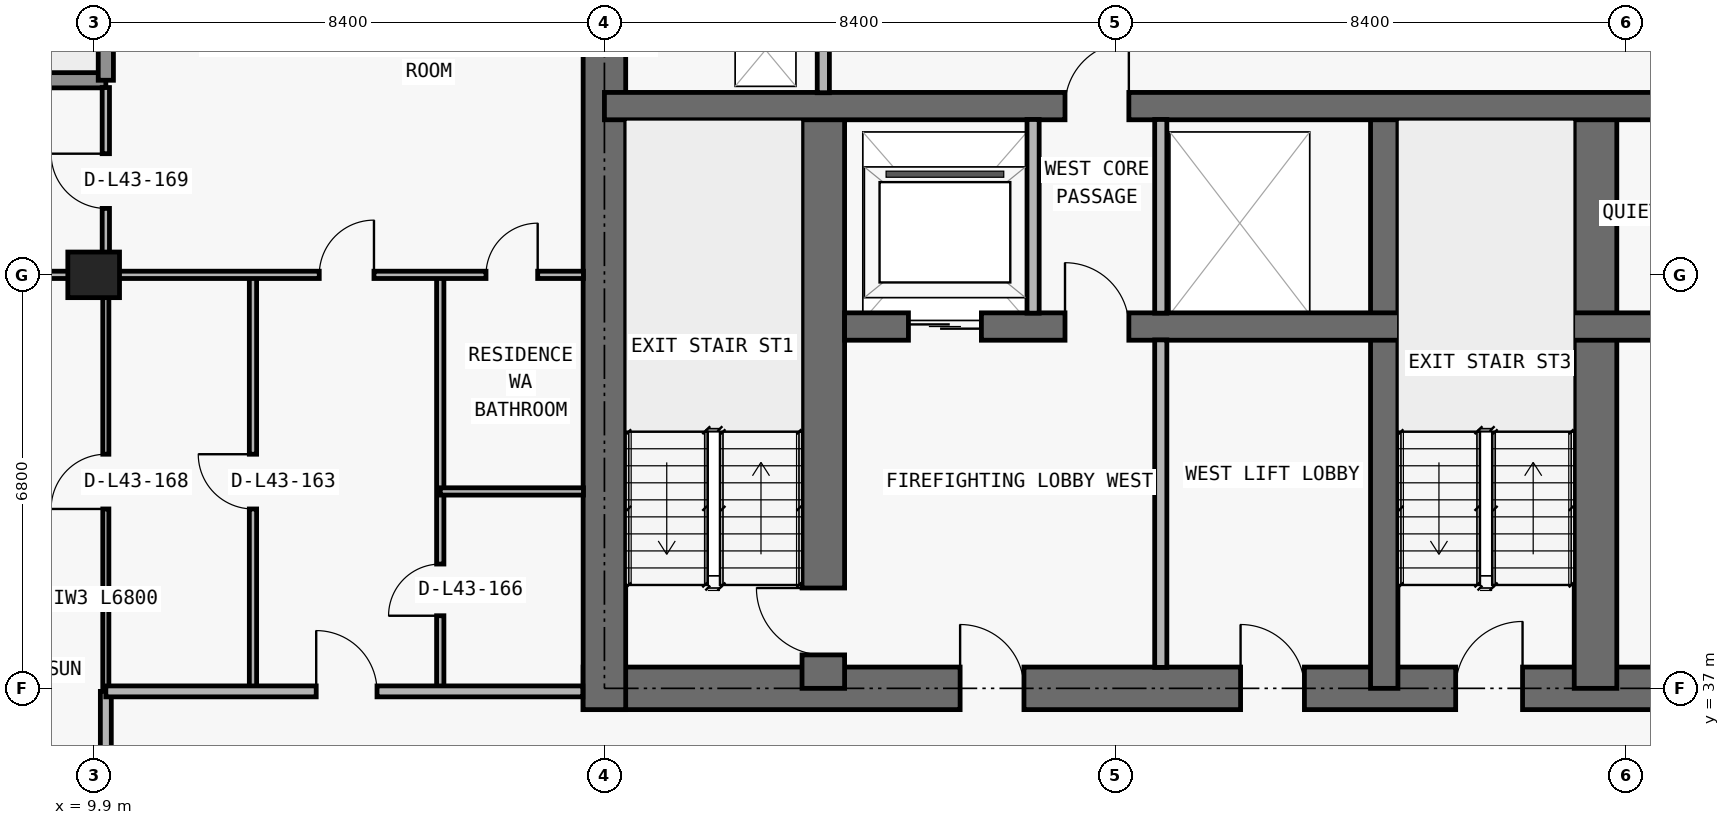
"""IFC4 building model, lengths in metres.
Left out: names, types, materials, properties, quantities, classifications, styles, units other than length and angle.
Written with IfcOpenShell. Run it as: python <this file> out.ifc"""

import sys

from ifc_helpers import new_model, si_unit, direction, frame, frame_2d, origin, origin_2d, place, context, subcontext, project, spatial, rectangle, extrude, element, fill, save


model = new_model("IFC4")
c1 = context("Model", 3, precision=1e-05, world=origin(), true_north=direction((0.0, 1.0)))
c2 = subcontext(c1, "Body", "Model", "MODEL_VIEW")
j1 = project(units=[si_unit("LENGTHUNIT", "METRE"), si_unit("PLANEANGLEUNIT", "RADIAN")], contexts=[c1])
p1 = place(None, origin())
s1 = spatial("IfcSite", under=j1, at=p1, CompositionType="ELEMENT")
p2 = place(p1, origin())
s2 = spatial("IfcBuilding", under=s1, at=p2, CompositionType="ELEMENT")
p3 = place(p2, frame((0.0, 0.0, 157.2)))
s3 = spatial("IfcBuildingStorey", under=s2, at=p3, CompositionType="ELEMENT", Elevation=157.2)
p4 = place(p3, frame((9.9, 43.8, 0.0), z_axis=(0.0, 0.0, 1.0), x_axis=(1.0, 0.0, 0.0)))
e1 = element("IfcColumn", 1, at=p4, inside=s3, PredefinedType="COLUMN", context=c2, shape_type="SweptSolid", body=[
    extrude(rectangle(XDim=0.85, YDim=0.75, at=origin_2d()), origin(), (0.0, 0.0, 1.0), 3.05),
])
p5 = place(p3, frame((17.95, 37.0, 0.0), z_axis=(0.0, 0.0, 1.0), x_axis=(1.0, 0.0, 0.0)))
e2 = element("IfcWall", 2, at=p5, inside=s3, PredefinedType="SHEAR", context=c2, shape_type="SweptSolid", body=[
    extrude(rectangle(XDim=41.9, YDim=0.7, at=frame_2d((20.95, 0.0))), origin(), (0.0, 0.0, 1.0), 3.05),
])
p6 = place(p5, frame((14.35, 0.0, 0.0)))
e3 = element("IfcOpeningElement", 3, at=p6, cuts=e2, PredefinedType="OPENING", context=c2, shape_type="SweptSolid", body=[
    extrude(rectangle(XDim=1.1, YDim=2.15, at=frame_2d((0.55, 1.075))), frame((0.0, 0.36, 0.0), z_axis=(0.0, -1.0, 0.0), x_axis=(1.0, 0.0, 0.0)), (0.0, 0.0, 1.0), 0.72),
])
p7 = place(p5, frame((6.2, 0.0, 0.0)))
e4 = element("IfcOpeningElement", 4, at=p7, cuts=e2, PredefinedType="OPENING", context=c2, shape_type="SweptSolid", body=[
    extrude(rectangle(XDim=1.05, YDim=2.15, at=frame_2d((0.525, 1.075))), frame((0.0, 0.36, 0.0), z_axis=(0.0, -1.0, 0.0), x_axis=(1.0, 0.0, 0.0)), (0.0, 0.0, 1.0), 0.72),
])
p8 = place(p5, frame((34.7, 0.0, 0.0)))
e5 = element("IfcOpeningElement", 5, at=p8, cuts=e2, PredefinedType="OPENING", context=c2, shape_type="SweptSolid", body=[
    extrude(rectangle(XDim=1.05, YDim=2.15, at=frame_2d((0.525, 1.075))), frame((0.0, 0.36, 0.0), z_axis=(0.0, -1.0, 0.0), x_axis=(1.0, 0.0, 0.0)), (0.0, 0.0, 1.0), 0.72),
])
p9 = place(p5, frame((10.812, 0.0, 0.0)))
e6 = element("IfcOpeningElement", 6, at=p9, cuts=e2, PredefinedType="OPENING", context=c2, shape_type="SweptSolid", body=[
    extrude(rectangle(XDim=1.05, YDim=2.15, at=frame_2d((0.525, 1.075))), frame((0.0, 0.36, 0.0), z_axis=(0.0, -1.0, 0.0), x_axis=(1.0, 0.0, 0.0)), (0.0, 0.0, 1.0), 0.72),
])
p10 = place(p5, frame((24.05, 0.0, 0.0)))
e7 = element("IfcOpeningElement", 7, at=p10, cuts=e2, PredefinedType="OPENING", context=c2, shape_type="SweptSolid", body=[
    extrude(rectangle(XDim=1.05, YDim=2.15, at=frame_2d((0.525, 1.075))), frame((0.0, 0.36, 0.0), z_axis=(0.0, -1.0, 0.0), x_axis=(1.0, 0.0, 0.0)), (0.0, 0.0, 1.0), 0.72),
])
p11 = place(p3, frame((18.3, 36.65, 0.0), z_axis=(0.0, 0.0, 1.0), x_axis=(0.0, 1.0, 0.0)))
e8 = element("IfcWall", 8, at=p11, inside=s3, PredefinedType="SHEAR", context=c2, shape_type="SweptSolid", body=[
    extrude(rectangle(XDim=13.95, YDim=0.7, at=frame_2d((6.975, 0.0))), origin(), (0.0, 0.0, 1.0), 3.05),
])
p12 = place(p3, frame((21.9, 37.0, 0.0), z_axis=(0.0, 0.0, 1.0), x_axis=(0.0, 1.0, 0.0)))
e9 = element("IfcWall", 9, at=p12, inside=s3, PredefinedType="SHEAR", context=c2, shape_type="SweptSolid", body=[
    extrude(rectangle(XDim=9.575, YDim=0.7, at=frame_2d((4.788, 0.0))), origin(), (0.0, 0.0, 1.0), 3.05),
])
p13 = place(p12, frame((0.55, 0.0, 0.0)))
e10 = element("IfcOpeningElement", 10, at=p13, cuts=e9, PredefinedType="OPENING", context=c2, shape_type="SweptSolid", body=[
    extrude(rectangle(XDim=1.1, YDim=2.15, at=frame_2d((0.55, 1.075))), frame((0.0, 0.36, 0.0), z_axis=(0.0, -1.0, 0.0), x_axis=(1.0, 0.0, 0.0)), (0.0, 0.0, 1.0), 0.72),
])
p14 = place(p3, frame((31.125, 37.0, 0.0), z_axis=(0.0, 0.0, 1.0), x_axis=(0.0, 1.0, 0.0)))
e11 = element("IfcWall", 11, at=p14, inside=s3, PredefinedType="SHEAR", context=c2, shape_type="SweptSolid", body=[
    extrude(rectangle(XDim=9.575, YDim=0.45, at=frame_2d((4.788, 0.0))), origin(), (0.0, 0.0, 1.0), 3.05),
])
p15 = place(p3, frame((34.6, 37.0, 0.0), z_axis=(0.0, 0.0, 1.0), x_axis=(0.0, 1.0, 0.0)))
e12 = element("IfcWall", 12, at=p15, inside=s3, PredefinedType="SHEAR", context=c2, shape_type="SweptSolid", body=[
    extrude(rectangle(XDim=9.575, YDim=0.7, at=frame_2d((4.788, 0.0))), origin(), (0.0, 0.0, 1.0), 3.05),
])
p16 = place(p3, frame((22.25, 42.95, 0.0), z_axis=(0.0, 0.0, 1.0), x_axis=(1.0, 0.0, 0.0)))
e13 = element("IfcWall", 13, at=p16, inside=s3, PredefinedType="SHEAR", context=c2, shape_type="SweptSolid", body=[
    extrude(rectangle(XDim=33.3, YDim=0.45, at=frame_2d((16.65, 0.0))), origin(), (0.0, 0.0, 1.0), 3.05),
])
p17 = place(p16, frame((1.05, 0.0, 0.0)))
e14 = element("IfcOpeningElement", 14, at=p17, cuts=e13, PredefinedType="OPENING", context=c2, shape_type="SweptSolid", body=[
    extrude(rectangle(XDim=1.2, YDim=2.2, at=frame_2d((0.6, 1.1))), frame((0.0, 0.235, 0.0), z_axis=(0.0, -1.0, 0.0), x_axis=(1.0, 0.0, 0.0)), (0.0, 0.0, 1.0), 0.47),
])
p18 = place(p16, frame((31.05, 0.0, 0.0)))
e15 = element("IfcOpeningElement", 15, at=p18, cuts=e13, PredefinedType="OPENING", context=c2, shape_type="SweptSolid", body=[
    extrude(rectangle(XDim=1.2, YDim=2.2, at=frame_2d((0.6, 1.1))), frame((0.0, 0.235, 0.0), z_axis=(0.0, -1.0, 0.0), x_axis=(1.0, 0.0, 0.0)), (0.0, 0.0, 1.0), 0.47),
])
p19 = place(p16, frame((21.4, 0.0, 0.0)))
e16 = element("IfcOpeningElement", 16, at=p19, cuts=e13, PredefinedType="OPENING", context=c2, shape_type="SweptSolid", body=[
    extrude(rectangle(XDim=1.1, YDim=2.2, at=frame_2d((0.55, 1.1))), frame((0.0, 0.235, 0.0), z_axis=(0.0, -1.0, 0.0), x_axis=(1.0, 0.0, 0.0)), (0.0, 0.0, 1.0), 0.47),
])
p20 = place(p16, frame((24.0, 0.0, 0.0)))
e17 = element("IfcOpeningElement", 17, at=p20, cuts=e13, PredefinedType="OPENING", context=c2, shape_type="SweptSolid", body=[
    extrude(rectangle(XDim=1.1, YDim=2.2, at=frame_2d((0.55, 1.1))), frame((0.0, 0.235, 0.0), z_axis=(0.0, -1.0, 0.0), x_axis=(1.0, 0.0, 0.0)), (0.0, 0.0, 1.0), 0.47),
])
p21 = place(p16, frame((3.625, 0.0, 0.0)))
e18 = element("IfcOpeningElement", 18, at=p21, cuts=e13, PredefinedType="OPENING", context=c2, shape_type="SweptSolid", body=[
    extrude(rectangle(XDim=1.05, YDim=2.15, at=frame_2d((0.525, 1.075))), frame((0.0, 0.235, 0.0), z_axis=(0.0, -1.0, 0.0), x_axis=(1.0, 0.0, 0.0)), (0.0, 0.0, 1.0), 0.47),
])
p22 = place(p16, frame((28.675, 0.0, 0.0)))
e19 = element("IfcOpeningElement", 19, at=p22, cuts=e13, PredefinedType="OPENING", context=c2, shape_type="SweptSolid", body=[
    extrude(rectangle(XDim=1.05, YDim=2.15, at=frame_2d((0.525, 1.075))), frame((0.0, 0.235, 0.0), z_axis=(0.0, -1.0, 0.0), x_axis=(1.0, 0.0, 0.0)), (0.0, 0.0, 1.0), 0.47),
])
p23 = place(p16, frame((15.975, 0.0, 0.0)))
e20 = element("IfcOpeningElement", 20, at=p23, cuts=e13, PredefinedType="OPENING", context=c2, shape_type="SweptSolid", body=[
    extrude(rectangle(XDim=1.0, YDim=2.2, at=frame_2d((0.5, 1.1))), frame((0.0, 0.235, 0.0), z_axis=(0.0, -1.0, 0.0), x_axis=(1.0, 0.0, 0.0)), (0.0, 0.0, 1.0), 0.47),
])
p24 = place(p3, frame((18.3, 46.575, 0.0), z_axis=(0.0, 0.0, 1.0), x_axis=(1.0, 0.0, 0.0)))
e21 = element("IfcWall", 21, at=p24, inside=s3, PredefinedType="SHEAR", context=c2, shape_type="SweptSolid", body=[
    extrude(rectangle(XDim=41.2, YDim=0.45, at=frame_2d((20.6, 0.0))), origin(), (0.0, 0.0, 1.0), 3.05),
])
p25 = place(p24, frame((7.575, 0.0, 0.0)))
e22 = element("IfcOpeningElement", 22, at=p25, cuts=e21, PredefinedType="OPENING", context=c2, shape_type="SweptSolid", body=[
    extrude(rectangle(XDim=1.05, YDim=2.15, at=frame_2d((0.525, 1.075))), frame((0.0, 0.235, 0.0), z_axis=(0.0, -1.0, 0.0), x_axis=(1.0, 0.0, 0.0)), (0.0, 0.0, 1.0), 0.47),
])
p26 = place(p24, frame((32.625, 0.0, 0.0)))
e23 = element("IfcOpeningElement", 23, at=p26, cuts=e21, PredefinedType="OPENING", context=c2, shape_type="SweptSolid", body=[
    extrude(rectangle(XDim=1.05, YDim=2.15, at=frame_2d((0.525, 1.075))), frame((0.0, 0.235, 0.0), z_axis=(0.0, -1.0, 0.0), x_axis=(1.0, 0.0, 0.0)), (0.0, 0.0, 1.0), 0.47),
])
p27 = place(p3, frame((6.25, 47.0, 0.0), z_axis=(0.0, 0.0, 1.0), x_axis=(1.0, 0.0, 0.0)))
e24 = element("IfcWall", 24, at=p27, inside=s3, PredefinedType="ELEMENTEDWALL", context=c2, shape_type="SweptSolid", body=[
    extrude(rectangle(XDim=3.85, YDim=0.25, at=frame_2d((1.925, 0.0))), origin(), (0.0, 0.0, 1.0), 3.05),
])
p28 = place(p3, frame((10.1, 47.0, 0.0), z_axis=(0.0, 0.0, 1.0), x_axis=(0.0, 1.0, 0.0)))
e25 = element("IfcWall", 25, at=p28, inside=s3, PredefinedType="ELEMENTEDWALL", context=c2, shape_type="SweptSolid", body=[
    extrude(rectangle(XDim=3.45, YDim=0.25, at=frame_2d((1.725, 0.0))), origin(), (0.0, 0.0, 1.0), 3.05),
])
p29 = place(p3, frame((10.1, 34.205, 0.0), z_axis=(0.0, 0.0, 1.0), x_axis=(0.0, 1.0, 0.0)))
e26 = element("IfcWall", 26, at=p29, inside=s3, PredefinedType="PARTITIONING", context=c2, shape_type="SweptSolid", body=[
    extrude(rectangle(XDim=2.745, YDim=0.18, at=frame_2d((1.373, 0.0))), origin(), (0.0, 0.0, 1.0), 2.263),
])
p30 = place(p3, frame((10.1, 37.0, 0.0), z_axis=(0.0, 0.0, 1.0), x_axis=(0.0, 1.0, 0.0)))
e27 = element("IfcWall", 27, at=p30, inside=s3, PredefinedType="MOVABLE", context=c2, shape_type="SweptSolid", body=[
    extrude(rectangle(XDim=6.8, YDim=0.1, at=frame_2d((3.4, 0.0))), origin(), (0.0, 0.0, 1.0), 2.263),
])
p31 = place(p30, frame((2.95, 0.0, 0.0)))
e28 = element("IfcOpeningElement", 28, at=p31, cuts=e27, PredefinedType="OPENING", context=c2, shape_type="SweptSolid", body=[
    extrude(rectangle(XDim=0.9, YDim=2.15, at=frame_2d((0.45, 1.075))), frame((0.0, 0.06, 0.0), z_axis=(0.0, -1.0, 0.0), x_axis=(1.0, 0.0, 0.0)), (0.0, 0.0, 1.0), 0.12),
])
p32 = place(p3, frame((10.1, 43.805, 0.0), z_axis=(0.0, 0.0, 1.0), x_axis=(0.0, 1.0, 0.0)))
e29 = element("IfcWall", 29, at=p32, inside=s3, PredefinedType="PARTITIONING", context=c2, shape_type="SweptSolid", body=[
    extrude(rectangle(XDim=3.075, YDim=0.12, at=frame_2d((1.538, 0.0))), origin(), (0.0, 0.0, 1.0), 3.05),
])
p33 = place(p32, frame((1.087, 0.0, 0.0)))
e30 = element("IfcOpeningElement", 30, at=p33, cuts=e29, PredefinedType="OPENING", context=c2, shape_type="SweptSolid", body=[
    extrude(rectangle(XDim=0.9, YDim=2.15, at=frame_2d((0.45, 1.075))), frame((0.0, 0.07, 0.0), z_axis=(0.0, -1.0, 0.0), x_axis=(1.0, 0.0, 0.0)), (0.0, 0.0, 1.0), 0.14),
])
p34 = place(p3, frame((12.52, 37.0, 0.0), z_axis=(0.0, 0.0, 1.0), x_axis=(0.0, 1.0, 0.0)))
e31 = element("IfcWall", 31, at=p34, inside=s3, PredefinedType="PARTITIONING", context=c2, shape_type="SweptSolid", body=[
    extrude(rectangle(XDim=6.8, YDim=0.12, at=frame_2d((3.4, 0.0))), origin(), (0.0, 0.0, 1.0), 3.05),
])
p35 = place(p34, frame((2.95, 0.0, 0.0)))
e32 = element("IfcOpeningElement", 32, at=p35, cuts=e31, PredefinedType="OPENING", context=c2, shape_type="SweptSolid", body=[
    extrude(rectangle(XDim=0.9, YDim=2.15, at=frame_2d((0.45, 1.075))), frame((0.0, 0.07, 0.0), z_axis=(0.0, -1.0, 0.0), x_axis=(1.0, 0.0, 0.0)), (0.0, 0.0, 1.0), 0.14),
])
p36 = place(p3, frame((15.6, 37.0, 0.0), z_axis=(0.0, 0.0, 1.0), x_axis=(0.0, 1.0, 0.0)))
e33 = element("IfcWall", 33, at=p36, inside=s3, PredefinedType="PARTITIONING", context=c2, shape_type="SweptSolid", body=[
    extrude(rectangle(XDim=6.8, YDim=0.12, at=frame_2d((3.4, 0.0))), origin(), (0.0, 0.0, 1.0), 3.05),
])
p37 = place(p36, frame((1.194, 0.0, 0.0)))
e34 = element("IfcOpeningElement", 34, at=p37, cuts=e33, PredefinedType="OPENING", context=c2, shape_type="SweptSolid", body=[
    extrude(rectangle(XDim=0.85, YDim=2.1, at=frame_2d((0.425, 1.05))), frame((0.0, 0.07, 0.0), z_axis=(0.0, -1.0, 0.0), x_axis=(1.0, 0.0, 0.0)), (0.0, 0.0, 1.0), 0.14),
])
p38 = place(p3, frame((21.9, 46.795, 0.0), z_axis=(0.0, 0.0, 1.0), x_axis=(0.0, 1.0, 0.0)))
e35 = element("IfcWall", 35, at=p38, inside=s3, PredefinedType="PARTITIONING", context=c2, shape_type="SweptSolid", body=[
    extrude(rectangle(XDim=3.16, YDim=0.2, at=frame_2d((1.58, 0.0))), origin(), (0.0, 0.0, 1.0), 3.05),
])
p39 = place(p3, frame((25.35, 43.17, 0.0), z_axis=(0.0, 0.0, 1.0), x_axis=(0.0, 1.0, 0.0)))
e36 = element("IfcWall", 36, at=p39, inside=s3, PredefinedType="PARTITIONING", context=c2, shape_type="SweptSolid", body=[
    extrude(rectangle(XDim=3.185, YDim=0.2, at=frame_2d((1.593, 0.0))), origin(), (0.0, 0.0, 1.0), 3.05),
])
p40 = place(p3, frame((27.45, 37.345, 0.0), z_axis=(0.0, 0.0, 1.0), x_axis=(0.0, 1.0, 0.0)))
e37 = element("IfcWall", 37, at=p40, inside=s3, PredefinedType="PARTITIONING", context=c2, shape_type="SweptSolid", body=[
    extrude(rectangle(XDim=5.385, YDim=0.2, at=frame_2d((2.692, 0.0))), origin(), (0.0, 0.0, 1.0), 3.05),
])
p41 = place(p3, frame((27.45, 43.17, 0.0), z_axis=(0.0, 0.0, 1.0), x_axis=(0.0, 1.0, 0.0)))
e38 = element("IfcWall", 38, at=p41, inside=s3, PredefinedType="PARTITIONING", context=c2, shape_type="SweptSolid", body=[
    extrude(rectangle(XDim=3.185, YDim=0.2, at=frame_2d((1.593, 0.0))), origin(), (0.0, 0.0, 1.0), 3.05),
])
p42 = place(p3, frame((10.1, 36.95, 0.0), z_axis=(0.0, 0.0, 1.0), x_axis=(1.0, 0.0, 0.0)))
e39 = element("IfcWall", 39, at=p42, inside=s3, PredefinedType="PARTITIONING", context=c2, shape_type="SweptSolid", body=[
    extrude(rectangle(XDim=7.845, YDim=0.18, at=frame_2d((3.922, 0.0))), origin(), (0.0, 0.0, 1.0), 3.05),
])
p43 = place(p42, frame((3.46, 0.0, 0.0)))
e40 = element("IfcOpeningElement", 40, at=p43, cuts=e39, PredefinedType="OPENING", context=c2, shape_type="SweptSolid", body=[
    extrude(rectangle(XDim=1.0, YDim=2.2, at=frame_2d((0.5, 1.1))), frame((0.0, 0.1, 0.0), z_axis=(0.0, -1.0, 0.0), x_axis=(1.0, 0.0, 0.0)), (0.0, 0.0, 1.0), 0.2),
])
p44 = place(p3, frame((15.6, 40.238, 0.0), z_axis=(0.0, 0.0, 1.0), x_axis=(1.0, 0.0, 0.0)))
e41 = element("IfcWall", 41, at=p44, inside=s3, PredefinedType="PARTITIONING", context=c2, shape_type="SweptSolid", body=[
    extrude(rectangle(XDim=2.355, YDim=0.12, at=frame_2d((1.177, 0.0))), origin(), (0.0, 0.0, 1.0), 3.05),
])
p45 = place(p3, frame((6.395, 43.8, 0.0), z_axis=(0.0, 0.0, 1.0), x_axis=(1.0, 0.0, 0.0)))
e42 = element("IfcWall", 42, at=p45, inside=s3, PredefinedType="PARTITIONING", context=c2, shape_type="SweptSolid", body=[
    extrude(rectangle(XDim=11.56, YDim=0.12, at=frame_2d((5.78, 0.0))), origin(), (0.0, 0.0, 1.0), 2.418),
])
p46 = place(p45, frame((7.215, 0.0, 0.0)))
e43 = element("IfcOpeningElement", 43, at=p46, cuts=e42, PredefinedType="OPENING", context=c2, shape_type="SweptSolid", body=[
    extrude(rectangle(XDim=0.9, YDim=2.15, at=frame_2d((0.45, 1.075))), frame((0.0, 0.07, 0.0), z_axis=(0.0, -1.0, 0.0), x_axis=(1.0, 0.0, 0.0)), (0.0, 0.0, 1.0), 0.14),
])
p47 = place(p45, frame((9.958, 0.0, 0.0)))
e44 = element("IfcOpeningElement", 44, at=p47, cuts=e42, PredefinedType="OPENING", context=c2, shape_type="SweptSolid", body=[
    extrude(rectangle(XDim=0.85, YDim=2.1, at=frame_2d((0.425, 1.05))), frame((0.0, 0.07, 0.0), z_axis=(0.0, -1.0, 0.0), x_axis=(1.0, 0.0, 0.0)), (0.0, 0.0, 1.0), 0.14),
])
p48 = place(p17, origin())
e45 = element("IfcDoor", 45, at=p48, inside=s3, OperationType="DOUBLE_DOOR_SLIDING", PredefinedType="DOOR", context=c2, shape_type="SweptSolid", body=[
    extrude(rectangle(XDim=1.2, YDim=2.2, at=frame_2d((0.6, 1.1))), frame((0.0, 0.025, 0.0), z_axis=(0.0, -1.0, 0.0), x_axis=(1.0, 0.0, 0.0)), (0.0, 0.0, 1.0), 0.05),
])
fill(e14, e45)
p49 = place(p6, origin())
e46 = element("IfcDoor", 46, at=p49, inside=s3, OperationType="SINGLE_SWING_RIGHT", PredefinedType="DOOR", context=c2, shape_type="SweptSolid", body=[
    extrude(rectangle(XDim=1.1, YDim=2.15, at=frame_2d((0.55, 1.075))), frame((0.0, 0.025, 0.0), z_axis=(0.0, -1.0, 0.0), x_axis=(1.0, 0.0, 0.0)), (0.0, 0.0, 1.0), 0.05),
])
fill(e3, e46)
p50 = place(p7, origin())
e47 = element("IfcDoor", 47, at=p50, inside=s3, OperationType="SINGLE_SWING_LEFT", PredefinedType="DOOR", context=c2, shape_type="SweptSolid", body=[
    extrude(rectangle(XDim=1.05, YDim=2.15, at=frame_2d((0.525, 1.075))), frame((0.0, 0.025, 0.0), z_axis=(0.0, -1.0, 0.0), x_axis=(1.0, 0.0, 0.0)), (0.0, 0.0, 1.0), 0.05),
])
fill(e4, e47)
p51 = place(p13, origin())
e48 = element("IfcDoor", 48, at=p51, inside=s3, OperationType="SINGLE_SWING_RIGHT", PredefinedType="DOOR", context=c2, shape_type="SweptSolid", body=[
    extrude(rectangle(XDim=1.1, YDim=2.15, at=frame_2d((0.55, 1.075))), frame((0.0, 0.025, 0.0), z_axis=(0.0, -1.0, 0.0), x_axis=(1.0, 0.0, 0.0)), (0.0, 0.0, 1.0), 0.05),
])
fill(e10, e48)
p52 = place(p21, origin())
e49 = element("IfcDoor", 49, at=p52, inside=s3, OperationType="SINGLE_SWING_LEFT", PredefinedType="DOOR", context=c2, shape_type="SweptSolid", body=[
    extrude(rectangle(XDim=1.05, YDim=2.15, at=frame_2d((0.525, 1.075))), frame((0.0, 0.025, 0.0), z_axis=(0.0, -1.0, 0.0), x_axis=(1.0, 0.0, 0.0)), (0.0, 0.0, 1.0), 0.05),
])
fill(e18, e49)
p53 = place(p9, origin())
e50 = element("IfcDoor", 50, at=p53, inside=s3, OperationType="SINGLE_SWING_LEFT", PredefinedType="DOOR", context=c2, shape_type="SweptSolid", body=[
    extrude(rectangle(XDim=1.05, YDim=2.15, at=frame_2d((0.525, 1.075))), frame((0.0, 0.025, 0.0), z_axis=(0.0, -1.0, 0.0), x_axis=(1.0, 0.0, 0.0)), (0.0, 0.0, 1.0), 0.05),
])
fill(e6, e50)
p54 = place(p25, origin())
e51 = element("IfcDoor", 51, at=p54, inside=s3, OperationType="SINGLE_SWING_RIGHT", PredefinedType="DOOR", context=c2, shape_type="SweptSolid", body=[
    extrude(rectangle(XDim=1.05, YDim=2.15, at=frame_2d((0.525, 1.075))), frame((0.0, 0.025, 0.0), z_axis=(0.0, -1.0, 0.0), x_axis=(1.0, 0.0, 0.0)), (0.0, 0.0, 1.0), 0.05),
])
fill(e22, e51)
p55 = place(p35, origin())
e52 = element("IfcDoor", 52, at=p55, inside=s3, OperationType="SINGLE_SWING_RIGHT", PredefinedType="DOOR", context=c2, shape_type="SweptSolid", body=[
    extrude(rectangle(XDim=0.9, YDim=2.15, at=frame_2d((0.45, 1.075))), frame((0.0, 0.025, 0.0), z_axis=(0.0, -1.0, 0.0), x_axis=(1.0, 0.0, 0.0)), (0.0, 0.0, 1.0), 0.05),
])
fill(e32, e52)
p56 = place(p43, origin())
e53 = element("IfcDoor", 53, at=p56, inside=s3, OperationType="SINGLE_SWING_LEFT", PredefinedType="DOOR", context=c2, shape_type="SweptSolid", body=[
    extrude(rectangle(XDim=1.0, YDim=2.2, at=frame_2d((0.5, 1.1))), frame((0.0, 0.025, 0.0), z_axis=(0.0, -1.0, 0.0), x_axis=(1.0, 0.0, 0.0)), (0.0, 0.0, 1.0), 0.05),
])
fill(e40, e53)
p57 = place(p46, origin())
e54 = element("IfcDoor", 54, at=p57, inside=s3, OperationType="SINGLE_SWING_RIGHT", PredefinedType="DOOR", context=c2, shape_type="SweptSolid", body=[
    extrude(rectangle(XDim=0.9, YDim=2.15, at=frame_2d((0.45, 1.075))), frame((0.0, 0.025, 0.0), z_axis=(0.0, -1.0, 0.0), x_axis=(1.0, 0.0, 0.0)), (0.0, 0.0, 1.0), 0.05),
])
fill(e43, e54)
p58 = place(p37, origin())
e55 = element("IfcDoor", 55, at=p58, inside=s3, OperationType="SINGLE_SWING_LEFT", PredefinedType="DOOR", context=c2, shape_type="SweptSolid", body=[
    extrude(rectangle(XDim=0.85, YDim=2.1, at=frame_2d((0.425, 1.05))), frame((0.0, 0.025, 0.0), z_axis=(0.0, -1.0, 0.0), x_axis=(1.0, 0.0, 0.0)), (0.0, 0.0, 1.0), 0.05),
])
fill(e34, e55)
p59 = place(p47, origin())
e56 = element("IfcDoor", 56, at=p59, inside=s3, OperationType="SINGLE_SWING_RIGHT", PredefinedType="DOOR", context=c2, shape_type="SweptSolid", body=[
    extrude(rectangle(XDim=0.85, YDim=2.1, at=frame_2d((0.425, 1.05))), frame((0.0, 0.025, 0.0), z_axis=(0.0, -1.0, 0.0), x_axis=(1.0, 0.0, 0.0)), (0.0, 0.0, 1.0), 0.05),
])
fill(e44, e56)
p60 = place(p31, origin())
e57 = element("IfcDoor", 57, at=p60, inside=s3, OperationType="SINGLE_SWING_LEFT", PredefinedType="DOOR", context=c2, shape_type="SweptSolid", body=[
    extrude(rectangle(XDim=0.9, YDim=2.15, at=frame_2d((0.45, 1.075))), frame((0.0, 0.025, 0.0), z_axis=(0.0, -1.0, 0.0), x_axis=(1.0, 0.0, 0.0)), (0.0, 0.0, 1.0), 0.05),
])
fill(e28, e57)
p61 = place(p33, origin())
e58 = element("IfcDoor", 58, at=p61, inside=s3, OperationType="SINGLE_SWING_RIGHT", PredefinedType="DOOR", context=c2, shape_type="SweptSolid", body=[
    extrude(rectangle(XDim=0.9, YDim=2.15, at=frame_2d((0.45, 1.075))), frame((0.0, 0.025, 0.0), z_axis=(0.0, -1.0, 0.0), x_axis=(1.0, 0.0, 0.0)), (0.0, 0.0, 1.0), 0.05),
])
fill(e30, e58)
save(model, sys.argv[1])
